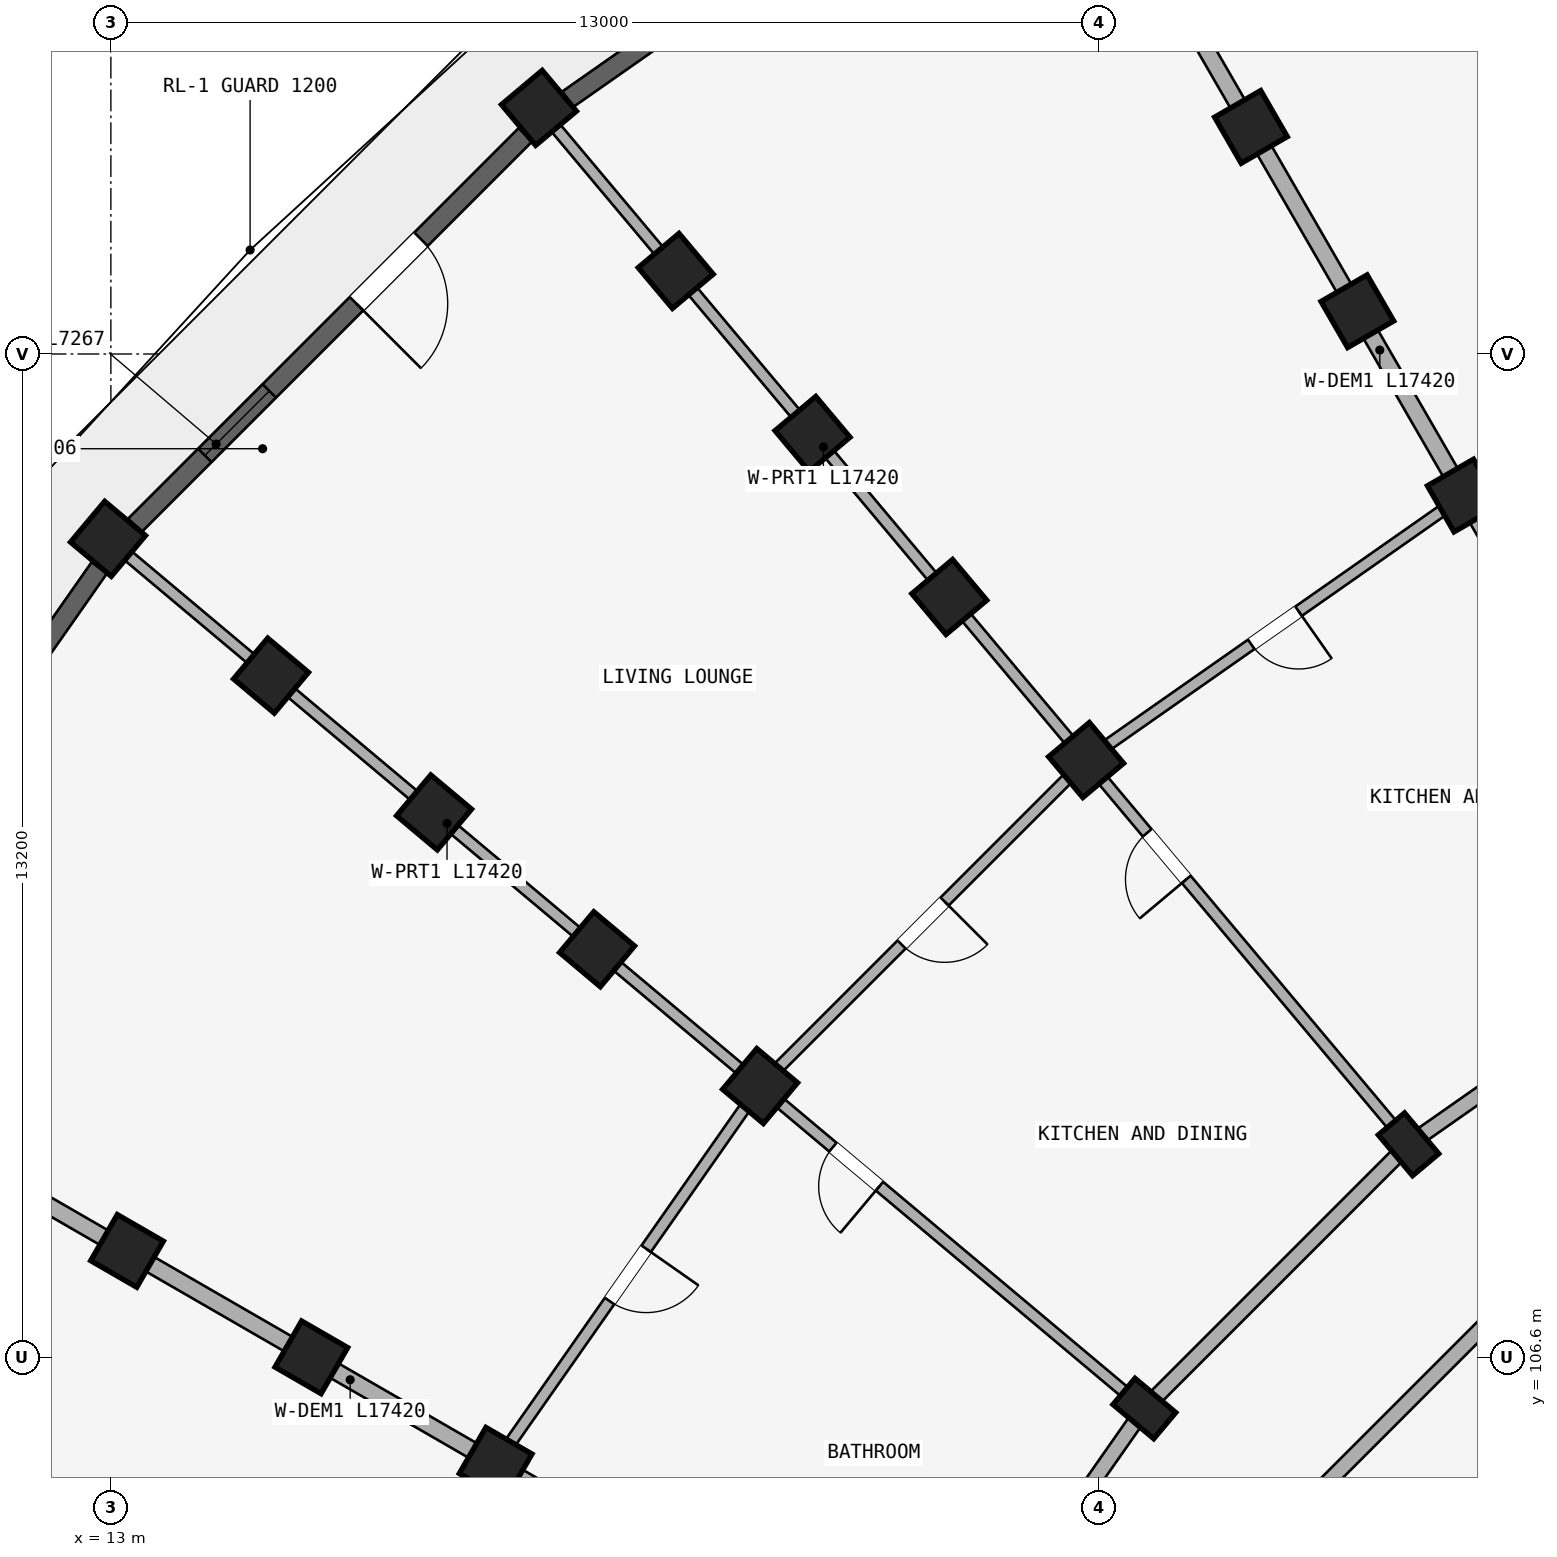
"""IFC4 building model, lengths in metres.
Left out: names, types, materials, properties, quantities, classifications, styles, units other than length and angle.
Written with IfcOpenShell. Run it as: python <this file> out.ifc"""

import sys

from ifc_helpers import new_model, si_unit, direction, frame, frame_2d, origin, origin_2d, place, context, subcontext, project, spatial, rectangle, extrude, element, fill, save


model = new_model("IFC4")
c1 = context("Model", 3, precision=1e-05, world=origin(), true_north=direction((0.0, 1.0)))
c2 = subcontext(c1, "Body", "Model", "MODEL_VIEW")
j1 = project(units=[si_unit("LENGTHUNIT", "METRE"), si_unit("PLANEANGLEUNIT", "RADIAN")], contexts=[c1])
p1 = place(None, origin())
s1 = spatial("IfcSite", under=j1, at=p1, CompositionType="ELEMENT")
p2 = place(p1, origin())
s2 = spatial("IfcBuilding", under=s1, at=p2, CompositionType="ELEMENT")
p3 = place(p2, frame((0.0, 0.0, 18.15)))
s3 = spatial("IfcBuildingStorey", under=s2, at=p3, CompositionType="ELEMENT", Elevation=18.15)
for number, where, z_axis, x_axis in (
    (1, (30.8, 117.938, 0.0), (0.0, 0.0, 1.0), (0.866, 0.5, 0.0)),
    (2, (29.4, 120.363, 0.0), (0.0, 0.0, 1.0), (0.866, 0.5, 0.0)),
    (3, (28.0, 122.787, 0.0), (0.0, 0.0, 1.0), (0.866, 0.5, 0.0)),
):
    element("IfcColumn", number, at=place(p3, frame(where, z_axis=z_axis, x_axis=x_axis)), inside=s3, PredefinedType="COLUMN", context=c2, shape_type="SweptSolid", body=[
        extrude(rectangle(XDim=0.7, YDim=0.7, at=origin_2d()), origin(), (0.0, 0.0, 1.0), 2.93),
    ])
p4 = place(p3, frame((30.073, 109.402, 0.0), z_axis=(0.0, 0.0, 1.0), x_axis=(0.766044443119, 0.642787609687, 0.0)))
e4 = element("IfcColumn", 4, at=p4, inside=s3, PredefinedType="COLUMN", context=c2, shape_type="SweptSolid", body=[
    extrude(rectangle(XDim=0.45, YDim=0.7, at=origin_2d()), origin(), (0.0, 0.0, 1.0), 2.93),
])
for number, where, z_axis, x_axis in (
    (5, (25.831, 114.458, 0.0), (0.0, 0.0, 1.0), (0.766, 0.643, 0.0)),
    (6, (24.031, 116.603, 0.0), (0.0, 0.0, 1.0), (0.766, 0.643, 0.0)),
    (7, (22.231, 118.748, 0.0), (0.0, 0.0, 1.0), (0.766, 0.643, 0.0)),
    (8, (20.432, 120.893, 0.0), (0.0, 0.0, 1.0), (0.766, 0.643, 0.0)),
    (9, (18.632, 123.038, 0.0), (0.0, 0.0, 1.0), (0.766, 0.643, 0.0)),
):
    element("IfcColumn", number, at=place(p3, frame(where, z_axis=z_axis, x_axis=x_axis)), inside=s3, PredefinedType="COLUMN", context=c2, shape_type="SweptSolid", body=[
        extrude(rectangle(XDim=0.7, YDim=0.7, at=origin_2d()), origin(), (0.0, 0.0, 1.0), 2.93),
    ])
p5 = place(p3, frame((26.598, 105.927, 0.0), z_axis=(0.0, 0.0, 1.0), x_axis=(0.642787609687, 0.766044443119, 0.0)))
e10 = element("IfcColumn", 10, at=p5, inside=s3, PredefinedType="COLUMN", context=c2, shape_type="SweptSolid", body=[
    extrude(rectangle(XDim=0.45, YDim=0.7, at=origin_2d()), origin(), (0.0, 0.0, 1.0), 2.93),
])
for number, where, z_axis, x_axis in (
    (11, (21.542, 110.169, 0.0), (0.0, 0.0, 1.0), (0.643, 0.766, 0.0)),
    (12, (19.397, 111.969, 0.0), (0.0, 0.0, 1.0), (0.643, 0.766, 0.0)),
    (13, (17.252, 113.769, 0.0), (0.0, 0.0, 1.0), (0.643, 0.766, 0.0)),
    (14, (15.107, 115.568, 0.0), (0.0, 0.0, 1.0), (0.643, 0.766, 0.0)),
    (15, (12.962, 117.368, 0.0), (0.0, 0.0, 1.0), (0.643, 0.766, 0.0)),
    (16, (18.062, 105.2, 0.0), (0.0, 0.0, 1.0), (0.5, 0.866, 0.0)),
    (17, (15.637, 106.6, 0.0), (0.0, 0.0, 1.0), (0.5, 0.866, 0.0)),
    (18, (13.213, 108.0, 0.0), (0.0, 0.0, 1.0), (0.5, 0.866, 0.0)),
):
    element("IfcColumn", number, at=place(p3, frame(where, z_axis=z_axis, x_axis=x_axis)), inside=s3, PredefinedType="COLUMN", context=c2, shape_type="SweptSolid", body=[
        extrude(rectangle(XDim=0.7, YDim=0.7, at=origin_2d()), origin(), (0.0, 0.0, 1.0), 2.93),
    ])
p6 = place(p3, frame((34.1, 112.222, 0.0), z_axis=(0.0, 0.0, 1.0), x_axis=(-0.819140911474, -0.573592335331, 0.0)))
e19 = element("IfcWall", 19, at=p6, inside=s3, PredefinedType="STANDARD", context=c2, shape_type="SweptSolid", body=[
    extrude(rectangle(XDim=4.916, YDim=0.2, at=frame_2d((2.458, 0.0))), origin(), (0.0, 0.0, 1.0), 2.372),
])
p7 = place(p6, frame((1.938, 0.0, 0.0)))
e20 = element("IfcOpeningElement", 20, at=p7, cuts=e19, PredefinedType="OPENING", context=c2, shape_type="SweptSolid", body=[
    extrude(rectangle(XDim=1.04, YDim=2.15, at=frame_2d((0.52, 1.075))), frame((0.0, 0.11, 0.0), z_axis=(0.0, -1.0, 0.0), x_axis=(1.0, 0.0, 0.0)), (0.0, 0.0, 1.0), 0.22),
])
p8 = place(p3, frame((31.616, 107.564, 0.0), z_axis=(0.0, 0.0, 1.0), x_axis=(-0.707106781187, -0.707106781187, 0.0)))
e21 = element("IfcWall", 21, at=p8, inside=s3, PredefinedType="STANDARD", context=c2, shape_type="SweptSolid", body=[
    extrude(rectangle(XDim=4.497, YDim=0.2, at=frame_2d((2.249, 0.0))), origin(), (0.0, 0.0, 1.0), 2.372),
])
p9 = place(p3, frame((30.073, 109.402, 0.0), z_axis=(0.0, 0.0, 1.0), x_axis=(-0.707106781187, -0.707106781187, 0.0)))
e22 = element("IfcWall", 22, at=p9, inside=s3, PredefinedType="STANDARD", context=c2, shape_type="SweptSolid", body=[
    extrude(rectangle(XDim=4.916, YDim=0.2, at=frame_2d((2.458, 0.0))), origin(), (0.0, 0.0, 1.0), 2.372),
])
p10 = place(p3, frame((26.598, 105.927, 0.0), z_axis=(0.0, 0.0, 1.0), x_axis=(-0.573592335331, -0.819140911474, 0.0)))
e23 = element("IfcWall", 23, at=p10, inside=s3, PredefinedType="STANDARD", context=c2, shape_type="SweptSolid", body=[
    extrude(rectangle(XDim=4.916, YDim=0.2, at=frame_2d((2.458, 0.0))), origin(), (0.0, 0.0, 1.0), 2.372),
])
p11 = place(p3, frame((34.05, 112.309, 0.0), z_axis=(0.0, 0.0, 1.0), x_axis=(-0.499997843263, 0.866026648973, 0.0)))
e24 = element("IfcWall", 24, at=p11, inside=s3, PredefinedType="STANDARD", context=c2, shape_type="SweptSolid", body=[
    extrude(rectangle(XDim=17.42, YDim=0.22, at=frame_2d((8.71, 0.0))), origin(), (0.0, 0.0, 1.0), 2.372),
])
p12 = place(p3, frame((30.009, 109.479, 0.0), z_axis=(0.0, 0.0, 1.0), x_axis=(-0.642784757967, 0.766046835987, 0.0)))
e25 = element("IfcWall", 25, at=p12, inside=s3, PredefinedType="PARTITIONING", context=c2, shape_type="SweptSolid", body=[
    extrude(rectangle(XDim=17.42, YDim=0.15, at=frame_2d((8.71, 0.0))), origin(), (0.0, 0.0, 1.0), 2.372),
])
p13 = place(p12, frame((4.45, 0.0, 0.0)))
e26 = element("IfcOpeningElement", 26, at=p13, cuts=e25, PredefinedType="OPENING", context=c2, shape_type="SweptSolid", body=[
    extrude(rectangle(XDim=0.8, YDim=2.1, at=frame_2d((0.4, 1.05))), frame((0.0, 0.085, 0.0), z_axis=(0.0, -1.0, 0.0), x_axis=(1.0, 0.0, 0.0)), (0.0, 0.0, 1.0), 0.17),
])
p14 = place(p3, frame((26.521, 105.991, 0.0), z_axis=(0.0, 0.0, 1.0), x_axis=(-0.766046835987, 0.642784757967, 0.0)))
e27 = element("IfcWall", 27, at=p14, inside=s3, PredefinedType="PARTITIONING", context=c2, shape_type="SweptSolid", body=[
    extrude(rectangle(XDim=17.42, YDim=0.15, at=frame_2d((8.71, 0.0))), origin(), (0.0, 0.0, 1.0), 2.372),
])
p15 = place(p14, frame((4.45, 0.0, 0.0)))
e28 = element("IfcOpeningElement", 28, at=p15, cuts=e27, PredefinedType="OPENING", context=c2, shape_type="SweptSolid", body=[
    extrude(rectangle(XDim=0.8, YDim=2.1, at=frame_2d((0.4, 1.05))), frame((0.0, 0.085, 0.0), z_axis=(0.0, -1.0, 0.0), x_axis=(1.0, 0.0, 0.0)), (0.0, 0.0, 1.0), 0.17),
])
p16 = place(p3, frame((23.691, 101.95, 0.0), z_axis=(0.0, 0.0, 1.0), x_axis=(-0.866026648973, 0.499997843263, 0.0)))
e29 = element("IfcWall", 29, at=p16, inside=s3, PredefinedType="STANDARD", context=c2, shape_type="SweptSolid", body=[
    extrude(rectangle(XDim=17.42, YDim=0.22, at=frame_2d((8.71, 0.0))), origin(), (0.0, 0.0, 1.0), 2.372),
])
p17 = place(p3, frame((36.298, 120.501, 0.0), z_axis=(0.0, 0.0, 1.0), x_axis=(-0.906312656069, -0.42260781991, 0.0)))
e30 = element("IfcWall", 30, at=p17, inside=s3, PredefinedType="PLUMBINGWALL", context=c2, shape_type="SweptSolid", body=[
    extrude(rectangle(XDim=6.066, YDim=0.15, at=frame_2d((3.033, 0.0))), origin(), (0.0, 0.0, 1.0), 2.372),
])
p18 = place(p17, frame((2.613, 0.0, 0.0)))
e31 = element("IfcOpeningElement", 31, at=p18, cuts=e30, PredefinedType="OPENING", context=c2, shape_type="SweptSolid", body=[
    extrude(rectangle(XDim=0.84, YDim=2.1, at=frame_2d((0.42, 1.05))), frame((0.0, 0.085, 0.0), z_axis=(0.0, -1.0, 0.0), x_axis=(1.0, 0.0, 0.0)), (0.0, 0.0, 1.0), 0.17),
])
p19 = place(p3, frame((30.8, 117.938, 0.0), z_axis=(0.0, 0.0, 1.0), x_axis=(-0.81913926159, -0.573594691504, 0.0)))
e32 = element("IfcWall", 32, at=p19, inside=s3, PredefinedType="PLUMBINGWALL", context=c2, shape_type="SweptSolid", body=[
    extrude(rectangle(XDim=6.066, YDim=0.15, at=frame_2d((3.033, 0.0))), origin(), (0.0, 0.0, 1.0), 2.372),
])
p20 = place(p19, frame((2.653, 0.0, 0.0)))
e33 = element("IfcOpeningElement", 33, at=p20, cuts=e32, PredefinedType="OPENING", context=c2, shape_type="SweptSolid", body=[
    extrude(rectangle(XDim=0.76, YDim=2.05, at=frame_2d((0.38, 1.025))), frame((0.0, 0.085, 0.0), z_axis=(0.0, -1.0, 0.0), x_axis=(1.0, 0.0, 0.0)), (0.0, 0.0, 1.0), 0.17),
])
p21 = place(p3, frame((25.831, 114.458, 0.0), z_axis=(0.0, 0.0, 1.0), x_axis=(-0.707106781187, -0.707106781187, 0.0)))
e34 = element("IfcWall", 34, at=p21, inside=s3, PredefinedType="PLUMBINGWALL", context=c2, shape_type="SweptSolid", body=[
    extrude(rectangle(XDim=6.066, YDim=0.15, at=frame_2d((3.033, 0.0))), origin(), (0.0, 0.0, 1.0), 2.372),
])
p22 = place(p21, frame((2.633, 0.0, 0.0)))
e35 = element("IfcOpeningElement", 35, at=p22, cuts=e34, PredefinedType="OPENING", context=c2, shape_type="SweptSolid", body=[
    extrude(rectangle(XDim=0.8, YDim=2.1, at=frame_2d((0.4, 1.05))), frame((0.0, 0.085, 0.0), z_axis=(0.0, -1.0, 0.0), x_axis=(1.0, 0.0, 0.0)), (0.0, 0.0, 1.0), 0.17),
])
p23 = place(p3, frame((21.542, 110.169, 0.0), z_axis=(0.0, 0.0, 1.0), x_axis=(-0.573594691504, -0.81913926159, 0.0)))
e36 = element("IfcWall", 36, at=p23, inside=s3, PredefinedType="PLUMBINGWALL", context=c2, shape_type="SweptSolid", body=[
    extrude(rectangle(XDim=6.066, YDim=0.15, at=frame_2d((3.033, 0.0))), origin(), (0.0, 0.0, 1.0), 2.372),
])
p24 = place(p23, frame((2.613, 0.0, 0.0)))
e37 = element("IfcOpeningElement", 37, at=p24, cuts=e36, PredefinedType="OPENING", context=c2, shape_type="SweptSolid", body=[
    extrude(rectangle(XDim=0.84, YDim=2.1, at=frame_2d((0.42, 1.05))), frame((0.0, 0.085, 0.0), z_axis=(0.0, -1.0, 0.0), x_axis=(1.0, 0.0, 0.0)), (0.0, 0.0, 1.0), 0.17),
])
p25 = place(p3, frame((18.062, 105.2, 0.0), z_axis=(0.0, 0.0, 1.0), x_axis=(-0.42260781991, -0.906312656069, 0.0)))
e38 = element("IfcWall", 38, at=p25, inside=s3, PredefinedType="PLUMBINGWALL", context=c2, shape_type="SweptSolid", body=[
    extrude(rectangle(XDim=6.066, YDim=0.15, at=frame_2d((3.033, 0.0))), origin(), (0.0, 0.0, 1.0), 2.372),
])
p26 = place(p25, frame((2.653, 0.0, 0.0)))
e39 = element("IfcOpeningElement", 39, at=p26, cuts=e38, PredefinedType="OPENING", context=c2, shape_type="SweptSolid", body=[
    extrude(rectangle(XDim=0.76, YDim=2.05, at=frame_2d((0.38, 1.025))), frame((0.0, 0.085, 0.0), z_axis=(0.0, -1.0, 0.0), x_axis=(1.0, 0.0, 0.0)), (0.0, 0.0, 1.0), 0.17),
])
p27 = place(p3, frame((24.964, 127.319, 0.0), z_axis=(0.0, 0.0, 1.0), x_axis=(-0.819159308599, -0.573566061701, 0.0)))
e40 = element("IfcWall", 40, at=p27, inside=s3, PredefinedType="STANDARD", context=c2, shape_type="SweptSolid", body=[
    extrude(rectangle(XDim=7.267, YDim=0.25, at=frame_2d((3.633, 0.0))), origin(), (0.0, 0.0, 1.0), 2.372),
])
p28 = place(p27, frame((2.808, 0.0, 0.422)))
e41 = element("IfcOpeningElement", 41, at=p28, cuts=e40, PredefinedType="OPENING", context=c2, shape_type="SweptSolid", body=[
    extrude(rectangle(XDim=1.65, YDim=1.75, at=frame_2d((0.825, 0.875))), frame((0.0, 0.135, 0.0), z_axis=(0.0, -1.0, 0.0), x_axis=(1.0, 0.0, 0.0)), (0.0, 0.0, 1.0), 0.27),
])
p29 = place(p3, frame((18.454, 122.684, 0.0), z_axis=(0.0, 0.0, 1.0), x_axis=(-0.707106781187, -0.707106781187, 0.0)))
e42 = element("IfcWall", 42, at=p29, inside=s3, PredefinedType="STANDARD", context=c2, shape_type="SweptSolid", body=[
    extrude(rectangle(XDim=7.267, YDim=0.25, at=frame_2d((3.633, 0.0))), origin(), (0.0, 0.0, 1.0), 2.372),
])
p30 = place(p29, frame((4.766, 0.0, 0.522)))
e43 = element("IfcOpeningElement", 43, at=p30, cuts=e42, PredefinedType="OPENING", context=c2, shape_type="SweptSolid", body=[
    extrude(rectangle(XDim=1.2, YDim=1.5, at=frame_2d((0.6, 0.75))), frame((0.0, 0.135, 0.0), z_axis=(0.0, -1.0, 0.0), x_axis=(1.0, 0.0, 0.0)), (0.0, 0.0, 1.0), 0.27),
])
p31 = place(p29, frame((1.943, 0.0, 0.0)))
e44 = element("IfcOpeningElement", 44, at=p31, cuts=e42, PredefinedType="OPENING", context=c2, shape_type="SweptSolid", body=[
    extrude(rectangle(XDim=1.2, YDim=2.15, at=frame_2d((0.6, 1.075))), frame((0.0, 0.135, 0.0), z_axis=(0.0, -1.0, 0.0), x_axis=(1.0, 0.0, 0.0)), (0.0, 0.0, 1.0), 0.27),
])
p32 = place(p3, frame((12.849, 116.989, 0.0), z_axis=(0.0, 0.0, 1.0), x_axis=(-0.573566061701, -0.819159308599, 0.0)))
e45 = element("IfcWall", 45, at=p32, inside=s3, PredefinedType="STANDARD", context=c2, shape_type="SweptSolid", body=[
    extrude(rectangle(XDim=7.267, YDim=0.25, at=frame_2d((3.633, 0.0))), origin(), (0.0, 0.0, 1.0), 2.372),
])
p33 = place(p32, frame((2.583, 0.0, 0.372)))
e46 = element("IfcOpeningElement", 46, at=p33, cuts=e45, PredefinedType="OPENING", context=c2, shape_type="SweptSolid", body=[
    extrude(rectangle(XDim=2.1, YDim=1.8, at=frame_2d((1.05, 0.9))), frame((0.0, 0.135, 0.0), z_axis=(0.0, -1.0, 0.0), x_axis=(1.0, 0.0, 0.0)), (0.0, 0.0, 1.0), 0.27),
])
p34 = place(p30, origin())
e47 = element("IfcWindow", 47, at=p34, inside=s3, PartitioningType="SINGLE_PANEL", PredefinedType="WINDOW", context=c2, shape_type="SweptSolid", body=[
    extrude(rectangle(XDim=1.2, YDim=1.5, at=frame_2d((0.6, 0.75))), frame((0.0, 0.03, 0.0), z_axis=(0.0, -1.0, 0.0), x_axis=(1.0, 0.0, 0.0)), (0.0, 0.0, 1.0), 0.06),
])
fill(e43, e47)
p35 = place(p13, frame((0.8, 0.0, 0.0), z_axis=(0.0, 0.0, 1.0), x_axis=(-1.0, 0.0, 0.0)))
e48 = element("IfcDoor", 48, at=p35, inside=s3, OperationType="SINGLE_SWING_RIGHT", PredefinedType="DOOR", context=c2, shape_type="SweptSolid", body=[
    extrude(rectangle(XDim=0.8, YDim=2.1, at=frame_2d((0.4, 1.05))), frame((0.0, 0.025, 0.0), z_axis=(0.0, -1.0, 0.0), x_axis=(1.0, 0.0, 0.0)), (0.0, 0.0, 1.0), 0.05),
])
fill(e26, e48)
p36 = place(p15, frame((0.8, 0.0, 0.0), z_axis=(0.0, 0.0, 1.0), x_axis=(-1.0, 0.0, 0.0)))
e49 = element("IfcDoor", 49, at=p36, inside=s3, OperationType="SINGLE_SWING_RIGHT", PredefinedType="DOOR", context=c2, shape_type="SweptSolid", body=[
    extrude(rectangle(XDim=0.8, YDim=2.1, at=frame_2d((0.4, 1.05))), frame((0.0, 0.025, 0.0), z_axis=(0.0, -1.0, 0.0), x_axis=(1.0, 0.0, 0.0)), (0.0, 0.0, 1.0), 0.05),
])
fill(e28, e49)
p37 = place(p20, frame((0.76, 0.0, 0.0), z_axis=(0.0, 0.0, 1.0), x_axis=(-1.0, 0.0, 0.0)))
e50 = element("IfcDoor", 50, at=p37, inside=s3, OperationType="SINGLE_SWING_RIGHT", PredefinedType="DOOR", context=c2, shape_type="SweptSolid", body=[
    extrude(rectangle(XDim=0.76, YDim=2.05, at=frame_2d((0.38, 1.025))), frame((0.0, 0.025, 0.0), z_axis=(0.0, -1.0, 0.0), x_axis=(1.0, 0.0, 0.0)), (0.0, 0.0, 1.0), 0.05),
])
fill(e33, e50)
p38 = place(p22, origin())
e51 = element("IfcDoor", 51, at=p38, inside=s3, OperationType="SINGLE_SWING_LEFT", PredefinedType="DOOR", context=c2, shape_type="SweptSolid", body=[
    extrude(rectangle(XDim=0.8, YDim=2.1, at=frame_2d((0.4, 1.05))), frame((0.0, 0.025, 0.0), z_axis=(0.0, -1.0, 0.0), x_axis=(1.0, 0.0, 0.0)), (0.0, 0.0, 1.0), 0.05),
])
fill(e35, e51)
p39 = place(p24, frame((0.84, 0.0, 0.0), z_axis=(0.0, 0.0, 1.0), x_axis=(-1.0, 0.0, 0.0)))
e52 = element("IfcDoor", 52, at=p39, inside=s3, OperationType="SINGLE_SWING_RIGHT", PredefinedType="DOOR", context=c2, shape_type="SweptSolid", body=[
    extrude(rectangle(XDim=0.84, YDim=2.1, at=frame_2d((0.42, 1.05))), frame((0.0, 0.025, 0.0), z_axis=(0.0, -1.0, 0.0), x_axis=(1.0, 0.0, 0.0)), (0.0, 0.0, 1.0), 0.05),
])
fill(e37, e52)
p40 = place(p31, frame((1.2, 0.0, 0.0), z_axis=(0.0, 0.0, 1.0), x_axis=(-1.0, 0.0, 0.0)))
e53 = element("IfcDoor", 53, at=p40, inside=s3, OperationType="SINGLE_SWING_LEFT", PredefinedType="DOOR", context=c2, shape_type="SweptSolid", body=[
    extrude(rectangle(XDim=1.2, YDim=2.15, at=frame_2d((0.6, 1.075))), frame((0.0, 0.025, 0.0), z_axis=(0.0, -1.0, 0.0), x_axis=(1.0, 0.0, 0.0)), (0.0, 0.0, 1.0), 0.05),
])
fill(e44, e53)
save(model, sys.argv[1])
